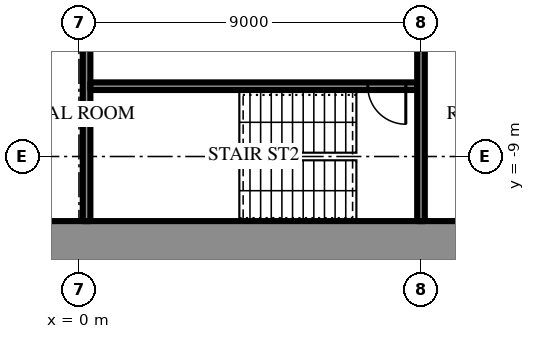
"""IFC4 building model, lengths in metres.
Left out: names, types, materials, properties, quantities, classifications, styles, units other than length and angle.
Written with IfcOpenShell. Run it as: python <this file> out.ifc"""

import sys

from ifc_helpers import new_model, si_unit, direction, frame, frame_2d, origin, place, context, subcontext, project, spatial, rectangle, extrude, element, fill, save


model = new_model("IFC4")
c1 = context("Model", 3, precision=1e-05, world=origin(), true_north=direction((0.0, 1.0)))
c2 = subcontext(c1, "Body", "Model", "MODEL_VIEW")
j1 = project(units=[si_unit("LENGTHUNIT", "METRE"), si_unit("PLANEANGLEUNIT", "RADIAN")], contexts=[c1])
p1 = place(None, origin())
s1 = spatial("IfcSite", under=j1, at=p1, CompositionType="ELEMENT")
p2 = place(p1, origin())
s2 = spatial("IfcBuilding", under=s1, at=p2, CompositionType="ELEMENT")
p3 = place(p2, frame((0.0, 0.0, 174.1)))
s3 = spatial("IfcBuildingStorey", under=s2, at=p3, CompositionType="ELEMENT", Elevation=174.1)
p4 = place(p3, frame((18.6, -11.5, 0.0), z_axis=(0.0, 0.0, 1.0), x_axis=(-1.0, 0.0, 0.0)))
e1 = element("IfcWall", 1, at=p4, inside=s3, PredefinedType="SHEAR", context=c2, shape_type="SweptSolid", body=[
    extrude(rectangle(XDim=37.2, YDim=1.6, at=frame_2d((18.6, 0.0))), origin(), (0.0, 0.0, 1.0), 4.2),
])
p5 = place(p4, frame((19.45, 0.0, 0.0)))
e2 = element("IfcOpeningElement", 2, at=p5, cuts=e1, PredefinedType="OPENING", context=c2, shape_type="SweptSolid", body=[
    extrude(rectangle(XDim=0.9, YDim=2.2, at=frame_2d((0.45, 1.1))), frame((0.0, 0.81, 0.0), z_axis=(0.0, -1.0, 0.0), x_axis=(1.0, 0.0, 0.0)), (0.0, 0.0, 1.0), 1.62),
])
p6 = place(p4, frame((22.45, 0.0, 0.0)))
e3 = element("IfcOpeningElement", 3, at=p6, cuts=e1, PredefinedType="OPENING", context=c2, shape_type="SweptSolid", body=[
    extrude(rectangle(XDim=0.9, YDim=2.2, at=frame_2d((0.45, 1.1))), frame((0.0, 0.81, 0.0), z_axis=(0.0, -1.0, 0.0), x_axis=(1.0, 0.0, 0.0)), (0.0, 0.0, 1.0), 1.62),
])
p7 = place(p4, frame((25.5, 0.0, 0.0)))
e4 = element("IfcOpeningElement", 4, at=p7, cuts=e1, PredefinedType="OPENING", context=c2, shape_type="SweptSolid", body=[
    extrude(rectangle(XDim=1.0, YDim=2.2, at=frame_2d((0.5, 1.1))), frame((0.0, 0.81, 0.0), z_axis=(0.0, -1.0, 0.0), x_axis=(1.0, 0.0, 0.0)), (0.0, 0.0, 1.0), 1.62),
])
p8 = place(p4, frame((1.8, 0.0, 0.0)))
e5 = element("IfcOpeningElement", 5, at=p8, cuts=e1, PredefinedType="OPENING", context=c2, shape_type="SweptSolid", body=[
    extrude(rectangle(XDim=0.9, YDim=2.2, at=frame_2d((0.45, 1.1))), frame((0.0, 0.81, 0.0), z_axis=(0.0, -1.0, 0.0), x_axis=(1.0, 0.0, 0.0)), (0.0, 0.0, 1.0), 1.62),
])
p9 = place(p4, frame((4.65, 0.0, 0.0)))
e6 = element("IfcOpeningElement", 6, at=p9, cuts=e1, PredefinedType="OPENING", context=c2, shape_type="SweptSolid", body=[
    extrude(rectangle(XDim=0.9, YDim=2.2, at=frame_2d((0.45, 1.1))), frame((0.0, 0.81, 0.0), z_axis=(0.0, -1.0, 0.0), x_axis=(1.0, 0.0, 0.0)), (0.0, 0.0, 1.0), 1.62),
])
p10 = place(p4, frame((7.75, 0.0, 0.0)))
e7 = element("IfcOpeningElement", 7, at=p10, cuts=e1, PredefinedType="OPENING", context=c2, shape_type="SweptSolid", body=[
    extrude(rectangle(XDim=0.9, YDim=2.2, at=frame_2d((0.45, 1.1))), frame((0.0, 0.81, 0.0), z_axis=(0.0, -1.0, 0.0), x_axis=(1.0, 0.0, 0.0)), (0.0, 0.0, 1.0), 1.62),
])
p11 = place(p4, frame((28.55, 0.0, 0.0)))
e8 = element("IfcOpeningElement", 8, at=p11, cuts=e1, PredefinedType="OPENING", context=c2, shape_type="SweptSolid", body=[
    extrude(rectangle(XDim=0.9, YDim=2.2, at=frame_2d((0.45, 1.1))), frame((0.0, 0.81, 0.0), z_axis=(0.0, -1.0, 0.0), x_axis=(1.0, 0.0, 0.0)), (0.0, 0.0, 1.0), 1.62),
])
p12 = place(p4, frame((31.65, 0.0, 0.0)))
e9 = element("IfcOpeningElement", 9, at=p12, cuts=e1, PredefinedType="OPENING", context=c2, shape_type="SweptSolid", body=[
    extrude(rectangle(XDim=0.9, YDim=2.2, at=frame_2d((0.45, 1.1))), frame((0.0, 0.81, 0.0), z_axis=(0.0, -1.0, 0.0), x_axis=(1.0, 0.0, 0.0)), (0.0, 0.0, 1.0), 1.62),
])
p13 = place(p4, frame((34.5, 0.0, 0.0)))
e10 = element("IfcOpeningElement", 10, at=p13, cuts=e1, PredefinedType="OPENING", context=c2, shape_type="SweptSolid", body=[
    extrude(rectangle(XDim=0.9, YDim=2.2, at=frame_2d((0.45, 1.1))), frame((0.0, 0.81, 0.0), z_axis=(0.0, -1.0, 0.0), x_axis=(1.0, 0.0, 0.0)), (0.0, 0.0, 1.0), 1.62),
])
p14 = place(p3, frame((0.2, -5.05, 0.0), z_axis=(0.0, 0.0, 1.0), x_axis=(0.0, -1.0, 0.0)))
e11 = element("IfcWall", 11, at=p14, inside=s3, PredefinedType="SHEAR", context=c2, shape_type="SweptSolid", body=[
    extrude(rectangle(XDim=5.65, YDim=0.2, at=frame_2d((2.825, 0.0))), origin(), (0.0, 0.0, 1.0), 4.2),
])
p15 = place(p3, frame((8.9, -7.15, 0.0), z_axis=(0.0, 0.0, 1.0), x_axis=(-1.0, 0.0, 0.0)))
e12 = element("IfcWall", 12, at=p15, inside=s3, PredefinedType="SHEAR", context=c2, shape_type="SweptSolid", body=[
    extrude(rectangle(XDim=8.6, YDim=0.2, at=frame_2d((4.3, 0.0))), origin(), (0.0, 0.0, 1.0), 4.2),
])
p16 = place(p15, frame((0.3, 0.0, 0.0)))
e13 = element("IfcOpeningElement", 13, at=p16, cuts=e12, PredefinedType="OPENING", context=c2, shape_type="SweptSolid", body=[
    extrude(rectangle(XDim=1.0, YDim=2.2, at=frame_2d((0.5, 1.1))), frame((0.0, 0.11, 0.0), z_axis=(0.0, -1.0, 0.0), x_axis=(1.0, 0.0, 0.0)), (0.0, 0.0, 1.0), 0.22),
])
p17 = place(p3, frame((9.0, -5.05, 0.0), z_axis=(0.0, 0.0, 1.0), x_axis=(0.0, -1.0, 0.0)))
e14 = element("IfcWall", 14, at=p17, inside=s3, PredefinedType="PARTITIONING", context=c2, shape_type="SweptSolid", body=[
    extrude(rectangle(XDim=5.65, YDim=0.2, at=frame_2d((2.825, 0.0))), origin(), (0.0, 0.0, 1.0), 4.0),
])
p18 = place(p16, origin())
e15 = element("IfcDoor", 15, at=p18, inside=s3, OperationType="SINGLE_SWING_RIGHT", PredefinedType="DOOR", context=c2, shape_type="SweptSolid", body=[
    extrude(rectangle(XDim=1.0, YDim=2.2, at=frame_2d((0.5, 1.1))), frame((0.0, 0.025, 0.0), z_axis=(0.0, -1.0, 0.0), x_axis=(1.0, 0.0, 0.0)), (0.0, 0.0, 1.0), 0.05),
])
fill(e13, e15)
save(model, sys.argv[1])
